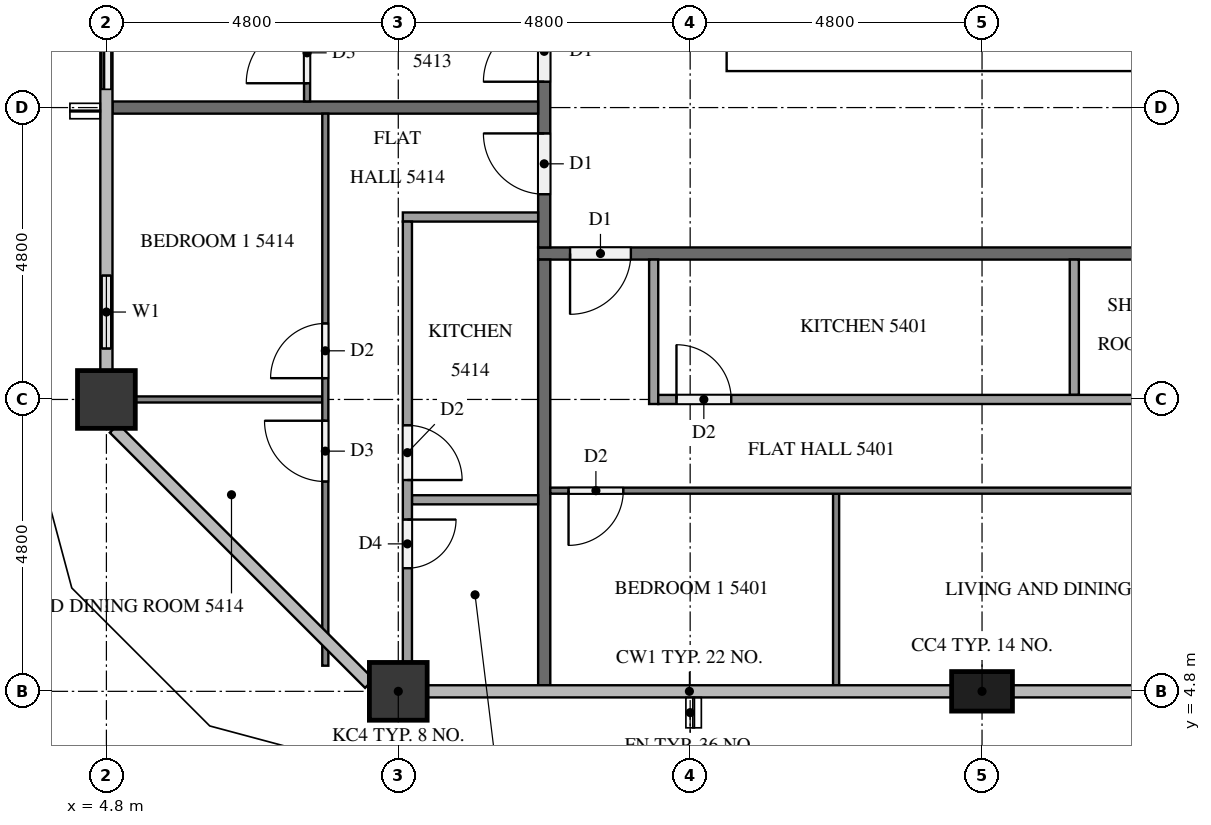
"""IFC4 building model, lengths in metres.
Left out: names, types, materials, properties, quantities, classifications, styles, units other than length and angle.
Written with IfcOpenShell. Run it as: python <this file> out.ifc"""

import sys

from ifc_helpers import new_model, si_unit, direction, frame, frame_2d, origin, origin_2d, place, context, subcontext, project, spatial, rectangle, extrude, element, fill, save


model = new_model("IFC4")
c1 = context("Model", 3, precision=1e-05, world=origin(), true_north=direction((0.0, 1.0)))
c2 = subcontext(c1, "Body", "Model", "MODEL_VIEW")
j1 = project(units=[si_unit("LENGTHUNIT", "METRE"), si_unit("PLANEANGLEUNIT", "RADIAN")], contexts=[c1])
p1 = place(None, origin())
s1 = spatial("IfcSite", under=j1, at=p1, CompositionType="ELEMENT")
p2 = place(p1, origin())
s2 = spatial("IfcBuilding", under=s1, at=p2, CompositionType="ELEMENT")
p3 = place(p2, frame((0.0, 0.0, 208.8)))
s3 = spatial("IfcBuildingStorey", under=s2, at=p3, CompositionType="ELEMENT", Elevation=208.8)
p4 = place(p3, frame((15.0, 15.35, 0.0), z_axis=(0.0, 0.0, 1.0), x_axis=(1.0, 0.0, 0.0)))
e1 = element("IfcWall", 1, at=p4, inside=s3, PredefinedType="SHEAR", context=c2, shape_type="SweptSolid", body=[
    extrude(rectangle(XDim=32.4, YDim=0.7, at=frame_2d((16.2, 0.0))), origin(), (0.0, 0.0, 1.0), 3.2),
])
p5 = place(p4, frame((15.3, 0.0, 0.0)))
e2 = element("IfcOpeningElement", 2, at=p5, cuts=e1, PredefinedType="OPENING", context=c2, shape_type="SweptSolid", body=[
    extrude(rectangle(XDim=1.8, YDim=2.1, at=frame_2d((0.9, 1.05))), frame((0.0, 0.36, 0.0), z_axis=(0.0, -1.0, 0.0), x_axis=(1.0, 0.0, 0.0)), (0.0, 0.0, 1.0), 0.72),
])
p6 = place(p3, frame((9.6, 4.8, 0.0), z_axis=(0.0, 0.0, 1.0), x_axis=(1.0, 0.0, 0.0)))
e3 = element("IfcColumn", 3, at=p6, inside=s3, PredefinedType="COLUMN", context=c2, shape_type="SweptSolid", body=[
    extrude(rectangle(XDim=0.95, YDim=0.95, at=origin_2d()), origin(), (0.0, 0.0, 1.0), 3.2),
])
p7 = place(p3, frame((19.2, 4.8, 0.0), z_axis=(0.0, 0.0, 1.0), x_axis=(1.0, 0.0, 0.0)))
e4 = element("IfcColumn", 4, at=p7, inside=s3, PredefinedType="COLUMN", context=c2, shape_type="SweptSolid", body=[
    extrude(rectangle(XDim=1.0, YDim=0.65, at=origin_2d()), origin(), (0.0, 0.0, 1.0), 3.2),
])
p8 = place(p3, frame((4.8, 9.6, 0.0), z_axis=(0.0, 0.0, 1.0), x_axis=(1.0, 0.0, 0.0)))
e5 = element("IfcColumn", 5, at=p8, inside=s3, PredefinedType="COLUMN", context=c2, shape_type="SweptSolid", body=[
    extrude(rectangle(XDim=0.95, YDim=0.95, at=origin_2d()), origin(), (0.0, 0.0, 1.0), 3.2),
])
p9 = place(p3, frame((21.6, 4.8, 0.0), z_axis=(0.0, 0.0, 1.0), x_axis=(1.0, 0.0, 0.0)))
e6 = element("IfcWall", 6, at=p9, inside=s3, PredefinedType="SOLIDWALL", context=c2, shape_type="SweptSolid", body=[
    extrude(rectangle(XDim=2.4, YDim=0.15, at=frame_2d((1.2, 0.0))), origin(), (0.0, 0.0, 1.0), 3.2),
])
p10 = place(p9, frame((0.3, 0.0, 0.0)))
e7 = element("IfcOpeningElement", 7, at=p10, cuts=e6, PredefinedType="OPENING", context=c2, shape_type="SweptSolid", body=[
    extrude(rectangle(XDim=1.8, YDim=2.4, at=frame_2d((0.9, 1.2))), frame((0.0, 0.085, 0.0), z_axis=(0.0, -1.0, 0.0), x_axis=(1.0, 0.0, 0.0)), (0.0, 0.0, 1.0), 0.17),
])
p11 = place(p3, frame((4.8, 16.8, 0.0), z_axis=(0.0, 0.0, 1.0), x_axis=(0.0, -1.0, 0.0)))
e8 = element("IfcWall", 8, at=p11, inside=s3, PredefinedType="SOLIDWALL", context=c2, shape_type="SweptSolid", body=[
    extrude(rectangle(XDim=2.4, YDim=0.15, at=frame_2d((1.2, 0.0))), origin(), (0.0, 0.0, 1.0), 3.2),
])
p12 = place(p11, frame((0.3, 0.0, 0.0)))
e9 = element("IfcOpeningElement", 9, at=p12, cuts=e8, PredefinedType="OPENING", context=c2, shape_type="SweptSolid", body=[
    extrude(rectangle(XDim=1.8, YDim=2.4, at=frame_2d((0.9, 1.2))), frame((0.0, 0.085, 0.0), z_axis=(0.0, -1.0, 0.0), x_axis=(1.0, 0.0, 0.0)), (0.0, 0.0, 1.0), 0.17),
])
p13 = place(p3, frame((4.8, 12.0, 0.0), z_axis=(0.0, 0.0, 1.0), x_axis=(0.0, -1.0, 0.0)))
e10 = element("IfcWall", 10, at=p13, inside=s3, PredefinedType="SOLIDWALL", context=c2, shape_type="SweptSolid", body=[
    extrude(rectangle(XDim=1.925, YDim=0.15, at=frame_2d((0.962, 0.0))), origin(), (0.0, 0.0, 1.0), 3.2),
])
p14 = place(p13, frame((0.363, 0.0, 0.9)))
e11 = element("IfcOpeningElement", 11, at=p14, cuts=e10, PredefinedType="OPENING", context=c2, shape_type="SweptSolid", body=[
    extrude(rectangle(XDim=1.2, YDim=1.4, at=frame_2d((0.6, 0.7))), frame((0.0, 0.085, 0.0), z_axis=(0.0, -1.0, 0.0), x_axis=(1.0, 0.0, 0.0)), (0.0, 0.0, 1.0), 0.17),
])
p15 = place(p3, frame((50.5, 12.0, 0.0), z_axis=(0.0, 0.0, 1.0), x_axis=(-1.0, 0.0, 0.0)))
e12 = element("IfcWall", 12, at=p15, inside=s3, PredefinedType="PARTITIONING", context=c2, shape_type="SweptSolid", body=[
    extrude(rectangle(XDim=38.6, YDim=0.2, at=frame_2d((19.3, 0.0))), origin(), (0.0, 0.0, 1.0), 3.2),
])
p16 = place(p15, frame((37.075, 0.0, 0.0)))
e13 = element("IfcOpeningElement", 13, at=p16, cuts=e12, PredefinedType="OPENING", context=c2, shape_type="SweptSolid", body=[
    extrude(rectangle(XDim=1.0, YDim=2.1, at=frame_2d((0.5, 1.05))), frame((0.0, 0.11, 0.0), z_axis=(0.0, -1.0, 0.0), x_axis=(1.0, 0.0, 0.0)), (0.0, 0.0, 1.0), 0.22),
])
p17 = place(p15, frame((20.275, 0.0, 0.0)))
e14 = element("IfcOpeningElement", 14, at=p17, cuts=e12, PredefinedType="OPENING", context=c2, shape_type="SweptSolid", body=[
    extrude(rectangle(XDim=1.0, YDim=2.1, at=frame_2d((0.5, 1.05))), frame((0.0, 0.11, 0.0), z_axis=(0.0, -1.0, 0.0), x_axis=(1.0, 0.0, 0.0)), (0.0, 0.0, 1.0), 0.22),
])
p18 = place(p15, frame((0.525, 0.0, 0.0)))
e15 = element("IfcOpeningElement", 15, at=p18, cuts=e12, PredefinedType="OPENING", context=c2, shape_type="SweptSolid", body=[
    extrude(rectangle(XDim=1.0, YDim=2.1, at=frame_2d((0.5, 1.05))), frame((0.0, 0.11, 0.0), z_axis=(0.0, -1.0, 0.0), x_axis=(1.0, 0.0, 0.0)), (0.0, 0.0, 1.0), 0.22),
])
p19 = place(p3, frame((12.0, 12.1, 0.0), z_axis=(0.0, 0.0, 1.0), x_axis=(0.0, 1.0, 0.0)))
e16 = element("IfcWall", 16, at=p19, inside=s3, PredefinedType="PARTITIONING", context=c2, shape_type="SweptSolid", body=[
    extrude(rectangle(XDim=28.6, YDim=0.2, at=frame_2d((14.3, 0.0))), origin(), (0.0, 0.0, 1.0), 3.2),
])
p20 = place(p19, frame((27.275, 0.0, 0.0)))
e17 = element("IfcOpeningElement", 17, at=p20, cuts=e16, PredefinedType="OPENING", context=c2, shape_type="SweptSolid", body=[
    extrude(rectangle(XDim=1.0, YDim=2.1, at=frame_2d((0.5, 1.05))), frame((0.0, 0.11, 0.0), z_axis=(0.0, -1.0, 0.0), x_axis=(1.0, 0.0, 0.0)), (0.0, 0.0, 1.0), 0.22),
])
p21 = place(p19, frame((12.325, 0.0, 0.0)))
e18 = element("IfcOpeningElement", 18, at=p21, cuts=e16, PredefinedType="OPENING", context=c2, shape_type="SweptSolid", body=[
    extrude(rectangle(XDim=1.0, YDim=2.1, at=frame_2d((0.5, 1.05))), frame((0.0, 0.11, 0.0), z_axis=(0.0, -1.0, 0.0), x_axis=(1.0, 0.0, 0.0)), (0.0, 0.0, 1.0), 0.22),
])
p22 = place(p19, frame((2.725, 0.0, 0.0)))
e19 = element("IfcOpeningElement", 19, at=p22, cuts=e16, PredefinedType="OPENING", context=c2, shape_type="SweptSolid", body=[
    extrude(rectangle(XDim=1.0, YDim=2.1, at=frame_2d((0.5, 1.05))), frame((0.0, 0.11, 0.0), z_axis=(0.0, -1.0, 0.0), x_axis=(1.0, 0.0, 0.0)), (0.0, 0.0, 1.0), 0.22),
])
p23 = place(p19, frame((0.875, 0.0, 0.0)))
e20 = element("IfcOpeningElement", 20, at=p23, cuts=e16, PredefinedType="OPENING", context=c2, shape_type="SweptSolid", body=[
    extrude(rectangle(XDim=1.0, YDim=2.1, at=frame_2d((0.5, 1.05))), frame((0.0, 0.11, 0.0), z_axis=(0.0, -1.0, 0.0), x_axis=(1.0, 0.0, 0.0)), (0.0, 0.0, 1.0), 0.22),
])
for number, where, z_axis, x_axis in (
    (21, (12.0, 4.9, 0.0), (0.0, 0.0, 1.0), (0.0, 1.0, 0.0)),
    (22, (4.9, 14.4, 0.0), (0.0, 0.0, 1.0), (1.0, 0.0, 0.0)),
):
    element("IfcWall", number, at=place(p3, frame(where, z_axis=z_axis, x_axis=x_axis)), inside=s3, PredefinedType="PARTITIONING", context=c2, shape_type="SweptSolid", body=[
        extrude(rectangle(XDim=7.0, YDim=0.2, at=frame_2d((3.5, 0.0))), origin(), (0.0, 0.0, 1.0), 3.2),
    ])
p24 = place(p3, frame((16.8, 8.05, 0.0), z_axis=(0.0, 0.0, 1.0), x_axis=(0.0, -1.0, 0.0)))
e23 = element("IfcWall", 23, at=p24, inside=s3, PredefinedType="PARTITIONING", context=c2, shape_type="SweptSolid", body=[
    extrude(rectangle(XDim=3.15, YDim=0.1, at=frame_2d((1.575, 0.0))), origin(), (0.0, 0.0, 1.0), 3.2),
])
p25 = place(p3, frame((28.7, 8.1, 0.0), z_axis=(0.0, 0.0, 1.0), x_axis=(-1.0, 0.0, 0.0)))
e24 = element("IfcWall", 24, at=p25, inside=s3, PredefinedType="PARTITIONING", context=c2, shape_type="SweptSolid", body=[
    extrude(rectangle(XDim=16.6, YDim=0.1, at=frame_2d((8.3, 0.0))), origin(), (0.0, 0.0, 1.0), 3.2),
])
p26 = place(p25, frame((15.4, 0.0, 0.0)))
e25 = element("IfcOpeningElement", 25, at=p26, cuts=e24, PredefinedType="OPENING", context=c2, shape_type="SweptSolid", body=[
    extrude(rectangle(XDim=0.9, YDim=2.1, at=frame_2d((0.45, 1.05))), frame((0.0, 0.06, 0.0), z_axis=(0.0, -1.0, 0.0), x_axis=(1.0, 0.0, 0.0)), (0.0, 0.0, 1.0), 0.12),
])
p27 = place(p25, frame((5.05, 0.0, 0.0)))
e26 = element("IfcOpeningElement", 26, at=p27, cuts=e24, PredefinedType="OPENING", context=c2, shape_type="SweptSolid", body=[
    extrude(rectangle(XDim=1.0, YDim=2.1, at=frame_2d((0.5, 1.05))), frame((0.0, 0.06, 0.0), z_axis=(0.0, -1.0, 0.0), x_axis=(1.0, 0.0, 0.0)), (0.0, 0.0, 1.0), 0.12),
])
p28 = place(p25, frame((3.45, 0.0, 0.0)))
e27 = element("IfcOpeningElement", 27, at=p28, cuts=e24, PredefinedType="OPENING", context=c2, shape_type="SweptSolid", body=[
    extrude(rectangle(XDim=0.9, YDim=2.1, at=frame_2d((0.45, 1.05))), frame((0.0, 0.06, 0.0), z_axis=(0.0, -1.0, 0.0), x_axis=(1.0, 0.0, 0.0)), (0.0, 0.0, 1.0), 0.12),
])
p29 = place(p3, frame((20.717, 11.9, 0.0), z_axis=(0.0, 0.0, 1.0), x_axis=(0.0, -1.0, 0.0)))
e28 = element("IfcWall", 28, at=p29, inside=s3, PredefinedType="PARTITIONING", context=c2, shape_type="SweptSolid", body=[
    extrude(rectangle(XDim=2.225, YDim=0.15, at=frame_2d((1.112, 0.0))), origin(), (0.0, 0.0, 1.0), 3.2),
])
p30 = place(p3, frame((13.8, 11.9, 0.0), z_axis=(0.0, 0.0, 1.0), x_axis=(0.0, -1.0, 0.0)))
e29 = element("IfcWall", 29, at=p30, inside=s3, PredefinedType="PARTITIONING", context=c2, shape_type="SweptSolid", body=[
    extrude(rectangle(XDim=2.375, YDim=0.15, at=frame_2d((1.188, 0.0))), origin(), (0.0, 0.0, 1.0), 3.2),
])
p31 = place(p3, frame((13.875, 9.6, 0.0), z_axis=(0.0, 0.0, 1.0), x_axis=(1.0, 0.0, 0.0)))
e30 = element("IfcWall", 30, at=p31, inside=s3, PredefinedType="PARTITIONING", context=c2, shape_type="SweptSolid", body=[
    extrude(rectangle(XDim=14.825, YDim=0.15, at=frame_2d((7.413, 0.0))), origin(), (0.0, 0.0, 1.0), 3.2),
])
p32 = place(p31, frame((0.3, 0.0, 0.0)))
e31 = element("IfcOpeningElement", 31, at=p32, cuts=e30, PredefinedType="OPENING", context=c2, shape_type="SweptSolid", body=[
    extrude(rectangle(XDim=0.9, YDim=2.1, at=frame_2d((0.45, 1.05))), frame((0.0, 0.085, 0.0), z_axis=(0.0, -1.0, 0.0), x_axis=(1.0, 0.0, 0.0)), (0.0, 0.0, 1.0), 0.17),
])
p33 = place(p31, frame((9.138, 0.0, 0.0)))
e32 = element("IfcOpeningElement", 32, at=p33, cuts=e30, PredefinedType="OPENING", context=c2, shape_type="SweptSolid", body=[
    extrude(rectangle(XDim=0.8, YDim=2.1, at=frame_2d((0.4, 1.05))), frame((0.0, 0.085, 0.0), z_axis=(0.0, -1.0, 0.0), x_axis=(1.0, 0.0, 0.0)), (0.0, 0.0, 1.0), 0.17),
])
p34 = place(p31, frame((10.588, 0.0, 0.0)))
e33 = element("IfcOpeningElement", 33, at=p34, cuts=e30, PredefinedType="OPENING", context=c2, shape_type="SweptSolid", body=[
    extrude(rectangle(XDim=0.9, YDim=2.1, at=frame_2d((0.45, 1.05))), frame((0.0, 0.085, 0.0), z_axis=(0.0, -1.0, 0.0), x_axis=(1.0, 0.0, 0.0)), (0.0, 0.0, 1.0), 0.17),
])
p35 = place(p3, frame((8.1, 14.5, 0.0), z_axis=(0.0, 0.0, 1.0), x_axis=(0.0, 1.0, 0.0)))
e34 = element("IfcWall", 34, at=p35, inside=s3, PredefinedType="PARTITIONING", context=c2, shape_type="SweptSolid", body=[
    extrude(rectangle(XDim=9.4, YDim=0.1, at=frame_2d((4.7, 0.0))), origin(), (0.0, 0.0, 1.0), 3.2),
])
p36 = place(p35, frame((0.3, 0.0, 0.0)))
e35 = element("IfcOpeningElement", 35, at=p36, cuts=e34, PredefinedType="OPENING", context=c2, shape_type="SweptSolid", body=[
    extrude(rectangle(XDim=1.0, YDim=2.1, at=frame_2d((0.5, 1.05))), frame((0.0, 0.06, 0.0), z_axis=(0.0, -1.0, 0.0), x_axis=(1.0, 0.0, 0.0)), (0.0, 0.0, 1.0), 0.12),
])
p37 = place(p35, frame((8.2, 0.0, 0.0)))
e36 = element("IfcOpeningElement", 36, at=p37, cuts=e34, PredefinedType="OPENING", context=c2, shape_type="SweptSolid", body=[
    extrude(rectangle(XDim=0.9, YDim=2.1, at=frame_2d((0.45, 1.05))), frame((0.0, 0.06, 0.0), z_axis=(0.0, -1.0, 0.0), x_axis=(1.0, 0.0, 0.0)), (0.0, 0.0, 1.0), 0.12),
])
p38 = place(p3, frame((8.35, 9.6, 0.0), z_axis=(0.0, 0.0, 1.0), x_axis=(-1.0, 0.0, 0.0)))
e37 = element("IfcWall", 37, at=p38, inside=s3, PredefinedType="PARTITIONING", context=c2, shape_type="SweptSolid", body=[
    extrude(rectangle(XDim=3.075, YDim=0.1, at=frame_2d((1.538, 0.0))), origin(), (0.0, 0.0, 1.0), 3.2),
])
p39 = place(p3, frame((8.4, 5.221, 0.0), z_axis=(0.0, 0.0, 1.0), x_axis=(0.0, 1.0, 0.0)))
e38 = element("IfcWall", 38, at=p39, inside=s3, PredefinedType="PARTITIONING", context=c2, shape_type="SweptSolid", body=[
    extrude(rectangle(XDim=9.079, YDim=0.1, at=frame_2d((4.539, 0.0))), origin(), (0.0, 0.0, 1.0), 3.2),
])
p40 = place(p39, frame((4.729, 0.0, 0.0)))
e39 = element("IfcOpeningElement", 39, at=p40, cuts=e38, PredefinedType="OPENING", context=c2, shape_type="SweptSolid", body=[
    extrude(rectangle(XDim=0.9, YDim=2.1, at=frame_2d((0.45, 1.05))), frame((0.0, 0.06, 0.0), z_axis=(0.0, -1.0, 0.0), x_axis=(1.0, 0.0, 0.0)), (0.0, 0.0, 1.0), 0.12),
])
p41 = place(p39, frame((3.029, 0.0, 0.0)))
e40 = element("IfcOpeningElement", 40, at=p41, cuts=e38, PredefinedType="OPENING", context=c2, shape_type="SweptSolid", body=[
    extrude(rectangle(XDim=1.0, YDim=2.1, at=frame_2d((0.5, 1.05))), frame((0.0, 0.06, 0.0), z_axis=(0.0, -1.0, 0.0), x_axis=(1.0, 0.0, 0.0)), (0.0, 0.0, 1.0), 0.12),
])
p42 = place(p3, frame((11.9, 7.95, 0.0), z_axis=(0.0, 0.0, 1.0), x_axis=(-1.0, 0.0, 0.0)))
e41 = element("IfcWall", 41, at=p42, inside=s3, PredefinedType="PARTITIONING", context=c2, shape_type="SweptSolid", body=[
    extrude(rectangle(XDim=2.075, YDim=0.15, at=frame_2d((1.038, 0.0))), origin(), (0.0, 0.0, 1.0), 3.2),
])
p43 = place(p3, frame((11.9, 12.6, 0.0), z_axis=(0.0, 0.0, 1.0), x_axis=(-1.0, 0.0, 0.0)))
e42 = element("IfcWall", 42, at=p43, inside=s3, PredefinedType="PARTITIONING", context=c2, shape_type="SweptSolid", body=[
    extrude(rectangle(XDim=2.225, YDim=0.15, at=frame_2d((1.112, 0.0))), origin(), (0.0, 0.0, 1.0), 3.2),
])
p44 = place(p3, frame((9.75, 12.525, 0.0), z_axis=(0.0, 0.0, 1.0), x_axis=(0.0, -1.0, 0.0)))
e43 = element("IfcWall", 43, at=p44, inside=s3, PredefinedType="PARTITIONING", context=c2, shape_type="SweptSolid", body=[
    extrude(rectangle(XDim=7.25, YDim=0.15, at=frame_2d((3.625, 0.0))), origin(), (0.0, 0.0, 1.0), 3.2),
])
p45 = place(p44, frame((3.35, 0.0, 0.0)))
e44 = element("IfcOpeningElement", 44, at=p45, cuts=e43, PredefinedType="OPENING", context=c2, shape_type="SweptSolid", body=[
    extrude(rectangle(XDim=0.9, YDim=2.1, at=frame_2d((0.45, 1.05))), frame((0.0, 0.085, 0.0), z_axis=(0.0, -1.0, 0.0), x_axis=(1.0, 0.0, 0.0)), (0.0, 0.0, 1.0), 0.17),
])
p46 = place(p44, frame((4.9, 0.0, 0.0)))
e45 = element("IfcOpeningElement", 45, at=p46, cuts=e43, PredefinedType="OPENING", context=c2, shape_type="SweptSolid", body=[
    extrude(rectangle(XDim=0.8, YDim=2.1, at=frame_2d((0.4, 1.05))), frame((0.0, 0.085, 0.0), z_axis=(0.0, -1.0, 0.0), x_axis=(1.0, 0.0, 0.0)), (0.0, 0.0, 1.0), 0.17),
])
p47 = place(p12, origin())
e46 = element("IfcDoor", 46, at=p47, inside=s3, OperationType="SLIDING_TO_RIGHT", PredefinedType="DOOR", context=c2, shape_type="SweptSolid", body=[
    extrude(rectangle(XDim=1.8, YDim=2.4, at=frame_2d((0.9, 1.2))), frame((0.0, 0.025, 0.0), z_axis=(0.0, -1.0, 0.0), x_axis=(1.0, 0.0, 0.0)), (0.0, 0.0, 1.0), 0.05),
])
fill(e9, e46)
p48 = place(p14, origin())
e47 = element("IfcWindow", 47, at=p48, inside=s3, PartitioningType="SINGLE_PANEL", PredefinedType="WINDOW", context=c2, shape_type="SweptSolid", body=[
    extrude(rectangle(XDim=1.2, YDim=1.4, at=frame_2d((0.6, 0.7))), frame((0.0, 0.03, 0.0), z_axis=(0.0, -1.0, 0.0), x_axis=(1.0, 0.0, 0.0)), (0.0, 0.0, 1.0), 0.06),
])
fill(e11, e47)
p49 = place(p16, origin())
e48 = element("IfcDoor", 48, at=p49, inside=s3, OperationType="SINGLE_SWING_RIGHT", PredefinedType="DOOR", context=c2, shape_type="SweptSolid", body=[
    extrude(rectangle(XDim=1.0, YDim=2.1, at=frame_2d((0.5, 1.05))), frame((0.0, 0.025, 0.0), z_axis=(0.0, -1.0, 0.0), x_axis=(1.0, 0.0, 0.0)), (0.0, 0.0, 1.0), 0.05),
])
fill(e13, e48)
p50 = place(p22, origin())
e49 = element("IfcDoor", 49, at=p50, inside=s3, OperationType="SINGLE_SWING_LEFT", PredefinedType="DOOR", context=c2, shape_type="SweptSolid", body=[
    extrude(rectangle(XDim=1.0, YDim=2.1, at=frame_2d((0.5, 1.05))), frame((0.0, 0.025, 0.0), z_axis=(0.0, -1.0, 0.0), x_axis=(1.0, 0.0, 0.0)), (0.0, 0.0, 1.0), 0.05),
])
fill(e19, e49)
p51 = place(p23, origin())
e50 = element("IfcDoor", 50, at=p51, inside=s3, OperationType="SINGLE_SWING_RIGHT", PredefinedType="DOOR", context=c2, shape_type="SweptSolid", body=[
    extrude(rectangle(XDim=1.0, YDim=2.1, at=frame_2d((0.5, 1.05))), frame((0.0, 0.025, 0.0), z_axis=(0.0, -1.0, 0.0), x_axis=(1.0, 0.0, 0.0)), (0.0, 0.0, 1.0), 0.05),
])
fill(e20, e50)
p52 = place(p26, origin())
e51 = element("IfcDoor", 51, at=p52, inside=s3, OperationType="SINGLE_SWING_RIGHT", PredefinedType="DOOR", context=c2, shape_type="SweptSolid", body=[
    extrude(rectangle(XDim=0.9, YDim=2.1, at=frame_2d((0.45, 1.05))), frame((0.0, 0.025, 0.0), z_axis=(0.0, -1.0, 0.0), x_axis=(1.0, 0.0, 0.0)), (0.0, 0.0, 1.0), 0.05),
])
fill(e25, e51)
p53 = place(p32, origin())
e52 = element("IfcDoor", 52, at=p53, inside=s3, OperationType="SINGLE_SWING_LEFT", PredefinedType="DOOR", context=c2, shape_type="SweptSolid", body=[
    extrude(rectangle(XDim=0.9, YDim=2.1, at=frame_2d((0.45, 1.05))), frame((0.0, 0.025, 0.0), z_axis=(0.0, -1.0, 0.0), x_axis=(1.0, 0.0, 0.0)), (0.0, 0.0, 1.0), 0.05),
])
fill(e31, e52)
p54 = place(p36, origin())
e53 = element("IfcDoor", 53, at=p54, inside=s3, OperationType="SINGLE_SWING_LEFT", PredefinedType="DOOR", context=c2, shape_type="SweptSolid", body=[
    extrude(rectangle(XDim=1.0, YDim=2.1, at=frame_2d((0.5, 1.05))), frame((0.0, 0.025, 0.0), z_axis=(0.0, -1.0, 0.0), x_axis=(1.0, 0.0, 0.0)), (0.0, 0.0, 1.0), 0.05),
])
fill(e35, e53)
p55 = place(p40, origin())
e54 = element("IfcDoor", 54, at=p55, inside=s3, OperationType="SINGLE_SWING_LEFT", PredefinedType="DOOR", context=c2, shape_type="SweptSolid", body=[
    extrude(rectangle(XDim=0.9, YDim=2.1, at=frame_2d((0.45, 1.05))), frame((0.0, 0.025, 0.0), z_axis=(0.0, -1.0, 0.0), x_axis=(1.0, 0.0, 0.0)), (0.0, 0.0, 1.0), 0.05),
])
fill(e39, e54)
p56 = place(p41, origin())
e55 = element("IfcDoor", 55, at=p56, inside=s3, OperationType="SINGLE_SWING_RIGHT", PredefinedType="DOOR", context=c2, shape_type="SweptSolid", body=[
    extrude(rectangle(XDim=1.0, YDim=2.1, at=frame_2d((0.5, 1.05))), frame((0.0, 0.025, 0.0), z_axis=(0.0, -1.0, 0.0), x_axis=(1.0, 0.0, 0.0)), (0.0, 0.0, 1.0), 0.05),
])
fill(e40, e55)
p57 = place(p45, origin())
e56 = element("IfcDoor", 56, at=p57, inside=s3, OperationType="SINGLE_SWING_RIGHT", PredefinedType="DOOR", context=c2, shape_type="SweptSolid", body=[
    extrude(rectangle(XDim=0.9, YDim=2.1, at=frame_2d((0.45, 1.05))), frame((0.0, 0.025, 0.0), z_axis=(0.0, -1.0, 0.0), x_axis=(1.0, 0.0, 0.0)), (0.0, 0.0, 1.0), 0.05),
])
fill(e44, e56)
p58 = place(p46, origin())
e57 = element("IfcDoor", 57, at=p58, inside=s3, OperationType="SINGLE_SWING_LEFT", PredefinedType="DOOR", context=c2, shape_type="SweptSolid", body=[
    extrude(rectangle(XDim=0.8, YDim=2.1, at=frame_2d((0.4, 1.05))), frame((0.0, 0.025, 0.0), z_axis=(0.0, -1.0, 0.0), x_axis=(1.0, 0.0, 0.0)), (0.0, 0.0, 1.0), 0.05),
])
fill(e45, e57)
save(model, sys.argv[1])
